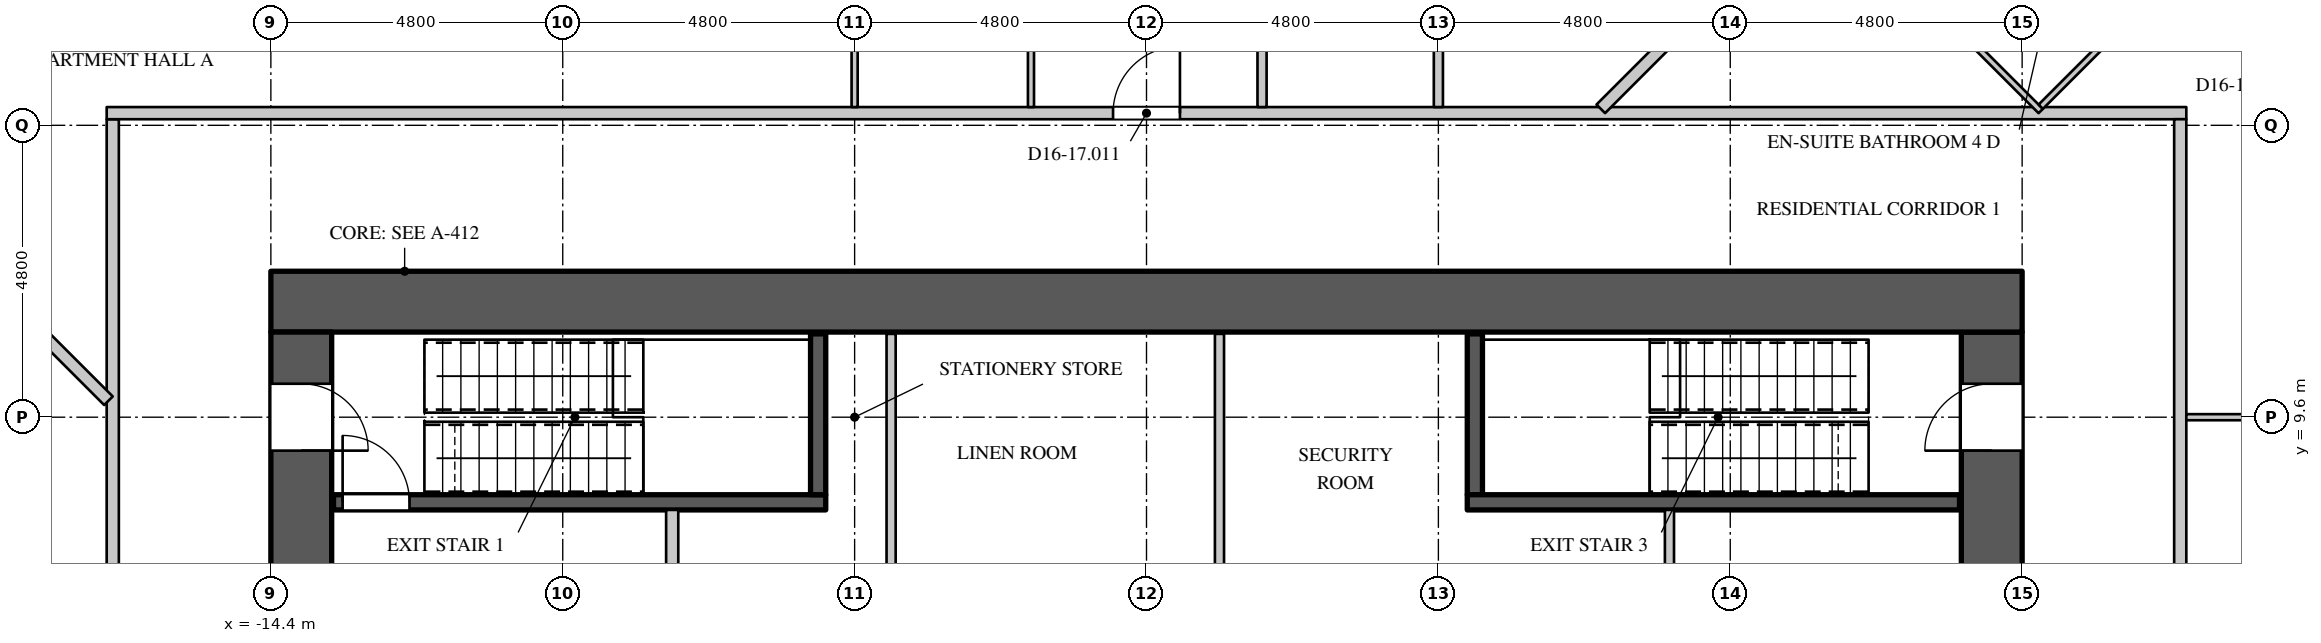
"""IFC4 building model, lengths in metres.
Left out: names, types, materials, properties, quantities, classifications, styles, units other than length and angle.
Written with IfcOpenShell. Run it as: python <this file> out.ifc"""

import sys

from ifc_helpers import new_model, si_unit, direction, frame, frame_2d, origin, place, context, subcontext, project, spatial, rectangle, extrude, element, fill, save


model = new_model("IFC4")
c1 = context("Model", 3, precision=1e-05, world=origin(), true_north=direction((0.0, 1.0)))
c2 = subcontext(c1, "Body", "Model", "MODEL_VIEW")
j1 = project(units=[si_unit("LENGTHUNIT", "METRE"), si_unit("PLANEANGLEUNIT", "RADIAN")], contexts=[c1])
p1 = place(None, origin())
s1 = spatial("IfcSite", under=j1, at=p1, CompositionType="ELEMENT")
p2 = place(p1, origin())
s2 = spatial("IfcBuilding", under=s1, at=p2, CompositionType="ELEMENT")
p3 = place(p2, frame((0.0, 0.0, 71.7)))
s3 = spatial("IfcBuildingStorey", under=s2, at=p3, CompositionType="ELEMENT", Elevation=71.7)
p4 = place(p3, frame((-14.4, 11.5, 0.0), z_axis=(0.0, 0.0, 1.0), x_axis=(1.0, 0.0, 0.0)))
e1 = element("IfcWall", 1, at=p4, inside=s3, PredefinedType="SHEAR", context=c2, shape_type="SweptSolid", body=[
    extrude(rectangle(XDim=28.8, YDim=1.0, at=frame_2d((14.4, 0.0))), origin(), (0.0, 0.0, 1.0), 4.2),
])
p5 = place(p3, frame((13.9, -11.0, 0.0), z_axis=(0.0, 0.0, 1.0), x_axis=(0.0, 1.0, 0.0)))
e2 = element("IfcWall", 2, at=p5, inside=s3, PredefinedType="SHEAR", context=c2, shape_type="SweptSolid", body=[
    extrude(rectangle(XDim=22.0, YDim=1.0, at=frame_2d((11.0, 0.0))), origin(), (0.0, 0.0, 1.0), 4.2),
])
p6 = place(p5, frame((20.05, 0.0, 0.0)))
e3 = element("IfcOpeningElement", 3, at=p6, cuts=e2, PredefinedType="OPENING", context=c2, shape_type="SweptSolid", body=[
    extrude(rectangle(XDim=1.1, YDim=2.2, at=frame_2d((0.55, 1.1))), frame((0.0, 0.51, 0.0), z_axis=(0.0, -1.0, 0.0), x_axis=(1.0, 0.0, 0.0)), (0.0, 0.0, 1.0), 1.02),
])
p7 = place(p5, frame((0.85, 0.0, 0.0)))
e4 = element("IfcOpeningElement", 4, at=p7, cuts=e2, PredefinedType="OPENING", context=c2, shape_type="SweptSolid", body=[
    extrude(rectangle(XDim=1.1, YDim=2.2, at=frame_2d((0.55, 1.1))), frame((0.0, 0.51, 0.0), z_axis=(0.0, -1.0, 0.0), x_axis=(1.0, 0.0, 0.0)), (0.0, 0.0, 1.0), 1.02),
])
p8 = place(p5, frame((14.55, 0.0, 0.0)))
e5 = element("IfcOpeningElement", 5, at=p8, cuts=e2, PredefinedType="OPENING", context=c2, shape_type="SweptSolid", body=[
    extrude(rectangle(XDim=1.5, YDim=2.4, at=frame_2d((0.75, 1.2))), frame((0.0, 0.51, 0.0), z_axis=(0.0, -1.0, 0.0), x_axis=(1.0, 0.0, 0.0)), (0.0, 0.0, 1.0), 1.02),
])
p9 = place(p5, frame((5.95, 0.0, 0.0)))
e6 = element("IfcOpeningElement", 6, at=p9, cuts=e2, PredefinedType="OPENING", context=c2, shape_type="SweptSolid", body=[
    extrude(rectangle(XDim=1.5, YDim=2.4, at=frame_2d((0.75, 1.2))), frame((0.0, 0.51, 0.0), z_axis=(0.0, -1.0, 0.0), x_axis=(1.0, 0.0, 0.0)), (0.0, 0.0, 1.0), 1.02),
])
p10 = place(p3, frame((-13.9, -11.0, 0.0), z_axis=(0.0, 0.0, 1.0), x_axis=(0.0, 1.0, 0.0)))
e7 = element("IfcWall", 7, at=p10, inside=s3, PredefinedType="SHEAR", context=c2, shape_type="SweptSolid", body=[
    extrude(rectangle(XDim=22.0, YDim=1.0, at=frame_2d((11.0, 0.0))), origin(), (0.0, 0.0, 1.0), 4.2),
])
p11 = place(p10, frame((20.05, 0.0, 0.0)))
e8 = element("IfcOpeningElement", 8, at=p11, cuts=e7, PredefinedType="OPENING", context=c2, shape_type="SweptSolid", body=[
    extrude(rectangle(XDim=1.1, YDim=2.2, at=frame_2d((0.55, 1.1))), frame((0.0, 0.51, 0.0), z_axis=(0.0, -1.0, 0.0), x_axis=(1.0, 0.0, 0.0)), (0.0, 0.0, 1.0), 1.02),
])
p12 = place(p10, frame((0.85, 0.0, 0.0)))
e9 = element("IfcOpeningElement", 9, at=p12, cuts=e7, PredefinedType="OPENING", context=c2, shape_type="SweptSolid", body=[
    extrude(rectangle(XDim=1.1, YDim=2.2, at=frame_2d((0.55, 1.1))), frame((0.0, 0.51, 0.0), z_axis=(0.0, -1.0, 0.0), x_axis=(1.0, 0.0, 0.0)), (0.0, 0.0, 1.0), 1.02),
])
p13 = place(p10, frame((15.75, 0.0, 0.0)))
e10 = element("IfcOpeningElement", 10, at=p13, cuts=e7, PredefinedType="OPENING", context=c2, shape_type="SweptSolid", body=[
    extrude(rectangle(XDim=1.5, YDim=2.4, at=frame_2d((0.75, 1.2))), frame((0.0, 0.51, 0.0), z_axis=(0.0, -1.0, 0.0), x_axis=(1.0, 0.0, 0.0)), (0.0, 0.0, 1.0), 1.02),
])
p14 = place(p10, frame((4.75, 0.0, 0.0)))
e11 = element("IfcOpeningElement", 11, at=p14, cuts=e7, PredefinedType="OPENING", context=c2, shape_type="SweptSolid", body=[
    extrude(rectangle(XDim=1.5, YDim=2.4, at=frame_2d((0.75, 1.2))), frame((0.0, 0.51, 0.0), z_axis=(0.0, -1.0, 0.0), x_axis=(1.0, 0.0, 0.0)), (0.0, 0.0, 1.0), 1.02),
])
p15 = place(p3, frame((-17.0, -14.5, 0.0), z_axis=(0.0, 0.0, 1.0), x_axis=(0.0, 1.0, 0.0)))
e12 = element("IfcWall", 12, at=p15, inside=s3, PredefinedType="PARTITIONING", context=c2, shape_type="SweptSolid", body=[
    extrude(rectangle(XDim=29.0, YDim=0.2, at=frame_2d((14.5, 0.0))), origin(), (0.0, 0.0, 1.0), 3.95),
])
p16 = place(p15, frame((11.9, 0.0, 0.0)))
e13 = element("IfcOpeningElement", 13, at=p16, cuts=e12, PredefinedType="OPENING", context=c2, shape_type="SweptSolid", body=[
    extrude(rectangle(XDim=1.1, YDim=2.4, at=frame_2d((0.55, 1.2))), frame((0.0, 0.11, 0.0), z_axis=(0.0, -1.0, 0.0), x_axis=(1.0, 0.0, 0.0)), (0.0, 0.0, 1.0), 0.22),
])
p17 = place(p3, frame((-17.1, 14.6, 0.0), z_axis=(0.0, 0.0, 1.0), x_axis=(1.0, 0.0, 0.0)))
e14 = element("IfcWall", 14, at=p17, inside=s3, PredefinedType="PARTITIONING", context=c2, shape_type="SweptSolid", body=[
    extrude(rectangle(XDim=34.2, YDim=0.2, at=frame_2d((17.1, 0.0))), origin(), (0.0, 0.0, 1.0), 3.95),
])
p18 = place(p17, frame((16.55, 0.0, 0.0)))
e15 = element("IfcOpeningElement", 15, at=p18, cuts=e14, PredefinedType="OPENING", context=c2, shape_type="SweptSolid", body=[
    extrude(rectangle(XDim=1.1, YDim=2.4, at=frame_2d((0.55, 1.2))), frame((0.0, 0.11, 0.0), z_axis=(0.0, -1.0, 0.0), x_axis=(1.0, 0.0, 0.0)), (0.0, 0.0, 1.0), 0.22),
])
p19 = place(p3, frame((-7.8, 2.8, 0.0), z_axis=(0.0, 0.0, 1.0), x_axis=(0.0, 1.0, 0.0)))
e16 = element("IfcWall", 16, at=p19, inside=s3, PredefinedType="PARTITIONING", context=c2, shape_type="SweptSolid", body=[
    extrude(rectangle(XDim=5.275, YDim=0.2, at=frame_2d((2.637, 0.0))), origin(), (0.0, 0.0, 1.0), 3.95),
])
p20 = place(p19, frame((0.75, 0.0, 0.0)))
e17 = element("IfcOpeningElement", 17, at=p20, cuts=e16, PredefinedType="OPENING", context=c2, shape_type="SweptSolid", body=[
    extrude(rectangle(XDim=1.5, YDim=2.4, at=frame_2d((0.75, 1.2))), frame((0.0, 0.11, 0.0), z_axis=(0.0, -1.0, 0.0), x_axis=(1.0, 0.0, 0.0)), (0.0, 0.0, 1.0), 0.22),
])
p21 = place(p3, frame((17.0, -14.5, 0.0), z_axis=(0.0, 0.0, 1.0), x_axis=(0.0, 1.0, 0.0)))
e18 = element("IfcWall", 18, at=p21, inside=s3, PredefinedType="PARTITIONING", context=c2, shape_type="SweptSolid", body=[
    extrude(rectangle(XDim=29.0, YDim=0.2, at=frame_2d((14.5, 0.0))), origin(), (0.0, 0.0, 1.0), 3.95),
])
p22 = place(p21, frame((16.1, 0.0, 0.0)))
e19 = element("IfcOpeningElement", 19, at=p22, cuts=e18, PredefinedType="OPENING", context=c2, shape_type="SweptSolid", body=[
    extrude(rectangle(XDim=1.1, YDim=2.4, at=frame_2d((0.55, 1.2))), frame((0.0, 0.11, 0.0), z_axis=(0.0, -1.0, 0.0), x_axis=(1.0, 0.0, 0.0)), (0.0, 0.0, 1.0), 0.22),
])
p23 = place(p3, frame((-21.028, 13.969, 0.0), z_axis=(0.0, 0.0, 1.0), x_axis=(0.707106781187, 0.707106781187, 0.0)))
e20 = element("IfcWall", 20, at=p23, inside=s3, PredefinedType="PARTITIONING", context=c2, shape_type="SweptSolid", body=[
    extrude(rectangle(XDim=12.696, YDim=0.15, at=frame_2d((6.348, 0.0))), origin(), (0.0, 0.0, 1.0), 3.95),
])
p24 = place(p23, frame((11.55, 0.0, 0.0)))
e21 = element("IfcOpeningElement", 21, at=p24, cuts=e20, PredefinedType="OPENING", context=c2, shape_type="SweptSolid", body=[
    extrude(rectangle(XDim=0.95, YDim=2.2, at=frame_2d((0.475, 1.1))), frame((0.0, 0.085, 0.0), z_axis=(0.0, -1.0, 0.0), x_axis=(1.0, 0.0, 0.0)), (0.0, 0.0, 1.0), 0.17),
])
for number, where, z_axis, x_axis in (
    (22, (-4.2, 5.9, 0.0), (0.0, 0.0, 1.0), (0.0, 1.0, 0.0)),
    (23, (1.2, 5.9, 0.0), (0.0, 0.0, 1.0), (0.0, 1.0, 0.0)),
):
    element("IfcWall", number, at=place(p3, frame(where, z_axis=z_axis, x_axis=x_axis)), inside=s3, PredefinedType="PARTITIONING", context=c2, shape_type="SweptSolid", body=[
        extrude(rectangle(XDim=5.07, YDim=0.15, at=frame_2d((2.535, 0.0))), origin(), (0.0, 0.0, 1.0), 3.95),
    ])
p25 = place(p3, frame((1.9, 14.7, 0.0), z_axis=(0.0, 0.0, 1.0), x_axis=(0.0, 1.0, 0.0)))
e24 = element("IfcWall", 24, at=p25, inside=s3, PredefinedType="PARTITIONING", context=c2, shape_type="SweptSolid", body=[
    extrude(rectangle(XDim=7.025, YDim=0.15, at=frame_2d((3.513, 0.0))), origin(), (0.0, 0.0, 1.0), 3.95),
])
p26 = place(p25, frame((3.0, 0.0, 0.0)))
e25 = element("IfcOpeningElement", 25, at=p26, cuts=e24, PredefinedType="OPENING", context=c2, shape_type="SweptSolid", body=[
    extrude(rectangle(XDim=0.95, YDim=2.2, at=frame_2d((0.475, 1.1))), frame((0.0, 0.085, 0.0), z_axis=(0.0, -1.0, 0.0), x_axis=(1.0, 0.0, 0.0)), (0.0, 0.0, 1.0), 0.17),
])
p27 = place(p3, frame((4.8, 14.7, 0.0), z_axis=(0.0, 0.0, 1.0), x_axis=(0.0, 1.0, 0.0)))
e26 = element("IfcWall", 26, at=p27, inside=s3, PredefinedType="PARTITIONING", context=c2, shape_type="SweptSolid", body=[
    extrude(rectangle(XDim=13.2, YDim=0.15, at=frame_2d((6.6, 0.0))), origin(), (0.0, 0.0, 1.0), 3.2),
])
p28 = place(p27, frame((3.0, 0.0, 0.0)))
e27 = element("IfcOpeningElement", 27, at=p28, cuts=e26, PredefinedType="OPENING", context=c2, shape_type="SweptSolid", body=[
    extrude(rectangle(XDim=0.95, YDim=2.2, at=frame_2d((0.475, 1.1))), frame((0.0, 0.085, 0.0), z_axis=(0.0, -1.0, 0.0), x_axis=(1.0, 0.0, 0.0)), (0.0, 0.0, 1.0), 0.17),
])
p29 = place(p3, frame((8.6, 5.9, 0.0), z_axis=(0.0, 0.0, 1.0), x_axis=(0.0, 1.0, 0.0)))
e28 = element("IfcWall", 28, at=p29, inside=s3, PredefinedType="PARTITIONING", context=c2, shape_type="SweptSolid", body=[
    extrude(rectangle(XDim=2.175, YDim=0.15, at=frame_2d((1.087, 0.0))), origin(), (0.0, 0.0, 1.0), 3.95),
])
p30 = place(p3, frame((17.216, 17.216, 0.0), z_axis=(0.0, 0.0, 1.0), x_axis=(0.707122656422, -0.707090905595, 0.0)))
e29 = element("IfcWall", 29, at=p30, inside=s3, PredefinedType="PARTITIONING", context=c2, shape_type="SweptSolid", body=[
    extrude(rectangle(XDim=7.689, YDim=0.15, at=frame_2d((3.845, 0.0))), origin(), (0.0, 0.0, 1.0), 3.95),
])
p31 = place(p30, frame((6.55, 0.0, 0.0)))
e30 = element("IfcOpeningElement", 30, at=p31, cuts=e29, PredefinedType="OPENING", context=c2, shape_type="SweptSolid", body=[
    extrude(rectangle(XDim=0.95, YDim=2.2, at=frame_2d((0.475, 1.1))), frame((0.0, 0.085, 0.0), z_axis=(0.0, -1.0, 0.0), x_axis=(1.0, 0.0, 0.0)), (0.0, 0.0, 1.0), 0.17),
])
p32 = place(p30, frame((2.6, 0.0, 0.0)))
e31 = element("IfcOpeningElement", 31, at=p32, cuts=e29, PredefinedType="OPENING", context=c2, shape_type="SweptSolid", body=[
    extrude(rectangle(XDim=0.95, YDim=2.2, at=frame_2d((0.475, 1.1))), frame((0.0, 0.085, 0.0), z_axis=(0.0, -1.0, 0.0), x_axis=(1.0, 0.0, 0.0)), (0.0, 0.0, 1.0), 0.17),
])
p33 = place(p3, frame((-25.239, 18.039, 0.0), z_axis=(0.0, 0.0, 1.0), x_axis=(0.707096213553, -0.707117348662, 0.0)))
e32 = element("IfcWall", 32, at=p33, inside=s3, PredefinedType="PARTITIONING", context=c2, shape_type="SweptSolid", body=[
    extrude(rectangle(XDim=11.552, YDim=0.2, at=frame_2d((5.776, 0.0))), origin(), (0.0, 0.0, 1.0), 3.95),
])
p34 = place(p3, frame((7.471, 14.671, 0.0), z_axis=(0.0, 0.0, 1.0), x_axis=(0.707098597128, 0.707114965151, 0.0)))
e33 = element("IfcWall", 33, at=p34, inside=s3, PredefinedType="PARTITIONING", context=c2, shape_type="SweptSolid", body=[
    extrude(rectangle(XDim=14.916, YDim=0.2, at=frame_2d((7.458, 0.0))), origin(), (0.0, 0.0, 1.0), 3.95),
])
p35 = place(p3, frame((-13.37, 8.2, 0.0), z_axis=(0.0, 0.0, 1.0), x_axis=(1.0, 0.0, 0.0)))
e34 = element("IfcWall", 34, at=p35, inside=s3, PredefinedType="SHEAR", context=c2, shape_type="SweptSolid", body=[
    extrude(rectangle(XDim=8.095, YDim=0.25, at=frame_2d((4.048, 0.0))), origin(), (0.0, 0.0, 1.0), 3.95),
])
p36 = place(p35, frame((0.15, 0.0, 0.0)))
e35 = element("IfcOpeningElement", 35, at=p36, cuts=e34, PredefinedType="OPENING", context=c2, shape_type="SweptSolid", body=[
    extrude(rectangle(XDim=1.1, YDim=2.2, at=frame_2d((0.55, 1.1))), frame((0.0, 0.135, 0.0), z_axis=(0.0, -1.0, 0.0), x_axis=(1.0, 0.0, 0.0)), (0.0, 0.0, 1.0), 0.27),
])
for number, where, z_axis, x_axis in (
    (36, (-5.4, 8.325, 0.0), (0.0, 0.0, 1.0), (0.0, 1.0, 0.0)),
    (37, (5.4, 8.325, 0.0), (0.0, 0.0, 1.0), (0.0, 1.0, 0.0)),
):
    element("IfcWall", number, at=place(p3, frame(where, z_axis=z_axis, x_axis=x_axis)), inside=s3, PredefinedType="SHEAR", context=c2, shape_type="SweptSolid", body=[
        extrude(rectangle(XDim=2.645, YDim=0.25, at=frame_2d((1.323, 0.0))), origin(), (0.0, 0.0, 1.0), 3.95),
    ])
p37 = place(p3, frame((5.275, 8.2, 0.0), z_axis=(0.0, 0.0, 1.0), x_axis=(1.0, 0.0, 0.0)))
e38 = element("IfcWall", 38, at=p37, inside=s3, PredefinedType="SHEAR", context=c2, shape_type="SweptSolid", body=[
    extrude(rectangle(XDim=8.095, YDim=0.25, at=frame_2d((4.048, 0.0))), origin(), (0.0, 0.0, 1.0), 3.95),
])
p38 = place(p3, frame((-4.8, 14.7, 0.0), z_axis=(0.0, 0.0, 1.0), x_axis=(0.0, 1.0, 0.0)))
e39 = element("IfcWall", 39, at=p38, inside=s3, PredefinedType="PARTITIONING", context=c2, shape_type="SweptSolid", body=[
    extrude(rectangle(XDim=8.32, YDim=0.1, at=frame_2d((4.16, 0.0))), origin(), (0.0, 0.0, 1.0), 3.2),
])
p39 = place(p38, frame((2.25, 0.0, 0.0)))
e40 = element("IfcOpeningElement", 40, at=p39, cuts=e39, PredefinedType="OPENING", context=c2, shape_type="SweptSolid", body=[
    extrude(rectangle(XDim=0.9, YDim=2.2, at=frame_2d((0.45, 1.1))), frame((0.0, 0.06, 0.0), z_axis=(0.0, -1.0, 0.0), x_axis=(1.0, 0.0, 0.0)), (0.0, 0.0, 1.0), 0.12),
])
p40 = place(p3, frame((-1.9, 14.7, 0.0), z_axis=(0.0, 0.0, 1.0), x_axis=(0.0, 1.0, 0.0)))
e41 = element("IfcWall", 41, at=p40, inside=s3, PredefinedType="PARTITIONING", context=c2, shape_type="SweptSolid", body=[
    extrude(rectangle(XDim=7.025, YDim=0.1, at=frame_2d((3.513, 0.0))), origin(), (0.0, 0.0, 1.0), 3.95),
])
p41 = place(p40, frame((3.05, 0.0, 0.0)))
e42 = element("IfcOpeningElement", 42, at=p41, cuts=e41, PredefinedType="OPENING", context=c2, shape_type="SweptSolid", body=[
    extrude(rectangle(XDim=0.9, YDim=2.2, at=frame_2d((0.45, 1.1))), frame((0.0, 0.06, 0.0), z_axis=(0.0, -1.0, 0.0), x_axis=(1.0, 0.0, 0.0)), (0.0, 0.0, 1.0), 0.12),
])
p42 = place(p3, frame((12.655, 16.686, 0.0), z_axis=(0.0, 0.0, 1.0), x_axis=(0.707148872128, -0.707064687739, 0.0)))
e43 = element("IfcWall", 43, at=p42, inside=s3, PredefinedType="PARTITIONING", context=c2, shape_type="SweptSolid", body=[
    extrude(rectangle(XDim=2.9, YDim=0.1, at=frame_2d((1.45, 0.0))), origin(), (0.0, 0.0, 1.0), 3.95),
])
p43 = place(p3, frame((14.706, 14.706, 0.0), z_axis=(0.0, 0.0, 1.0), x_axis=(0.707106781187, 0.707106781187, 0.0)))
e44 = element("IfcWall", 44, at=p43, inside=s3, PredefinedType="PARTITIONING", context=c2, shape_type="SweptSolid", body=[
    extrude(rectangle(XDim=3.53, YDim=0.1, at=frame_2d((1.765, 0.0))), origin(), (0.0, 0.0, 1.0), 3.95),
])
p44 = place(p3, frame((17.1, 9.6, 0.0), z_axis=(0.0, 0.0, 1.0), x_axis=(1.0, 0.0, 0.0)))
e45 = element("IfcWall", 45, at=p44, inside=s3, PredefinedType="PARTITIONING", context=c2, shape_type="SweptSolid", body=[
    extrude(rectangle(XDim=4.7, YDim=0.1, at=frame_2d((2.35, 0.0))), origin(), (0.0, 0.0, 1.0), 3.95),
])
p45 = place(p44, frame((1.85, 0.0, 0.0)))
e46 = element("IfcOpeningElement", 46, at=p45, cuts=e45, PredefinedType="OPENING", context=c2, shape_type="SweptSolid", body=[
    extrude(rectangle(XDim=0.9, YDim=2.2, at=frame_2d((0.45, 1.1))), frame((0.0, 0.06, 0.0), z_axis=(0.0, -1.0, 0.0), x_axis=(1.0, 0.0, 0.0)), (0.0, 0.0, 1.0), 0.12),
])
p46 = place(p36, origin())
e47 = element("IfcDoor", 47, at=p46, inside=s3, OperationType="SINGLE_SWING_LEFT", PredefinedType="DOOR", context=c2, shape_type="SweptSolid", body=[
    extrude(rectangle(XDim=1.1, YDim=2.2, at=frame_2d((0.55, 1.1))), frame((0.0, 0.025, 0.0), z_axis=(0.0, -1.0, 0.0), x_axis=(1.0, 0.0, 0.0)), (0.0, 0.0, 1.0), 0.05),
])
fill(e35, e47)
p47 = place(p11, origin())
e48 = element("IfcDoor", 48, at=p47, inside=s3, OperationType="SINGLE_SWING_RIGHT", PredefinedType="DOOR", context=c2, shape_type="SweptSolid", body=[
    extrude(rectangle(XDim=1.1, YDim=2.2, at=frame_2d((0.55, 1.1))), frame((0.0, -0.445, 0.0), z_axis=(0.0, -1.0, 0.0), x_axis=(1.0, 0.0, 0.0)), (0.0, 0.0, 1.0), 0.05),
])
fill(e8, e48)
p48 = place(p6, origin())
e49 = element("IfcDoor", 49, at=p48, inside=s3, OperationType="SINGLE_SWING_LEFT", PredefinedType="DOOR", context=c2, shape_type="SweptSolid", body=[
    extrude(rectangle(XDim=1.1, YDim=2.2, at=frame_2d((0.55, 1.1))), frame((0.0, 0.495, 0.0), z_axis=(0.0, -1.0, 0.0), x_axis=(1.0, 0.0, 0.0)), (0.0, 0.0, 1.0), 0.05),
])
fill(e3, e49)
p49 = place(p18, origin())
e50 = element("IfcDoor", 50, at=p49, inside=s3, OperationType="SINGLE_SWING_RIGHT", PredefinedType="DOOR", context=c2, shape_type="SweptSolid", body=[
    extrude(rectangle(XDim=1.1, YDim=2.4, at=frame_2d((0.55, 1.2))), frame((0.0, 0.025, 0.0), z_axis=(0.0, -1.0, 0.0), x_axis=(1.0, 0.0, 0.0)), (0.0, 0.0, 1.0), 0.05),
])
fill(e15, e50)
save(model, sys.argv[1])
